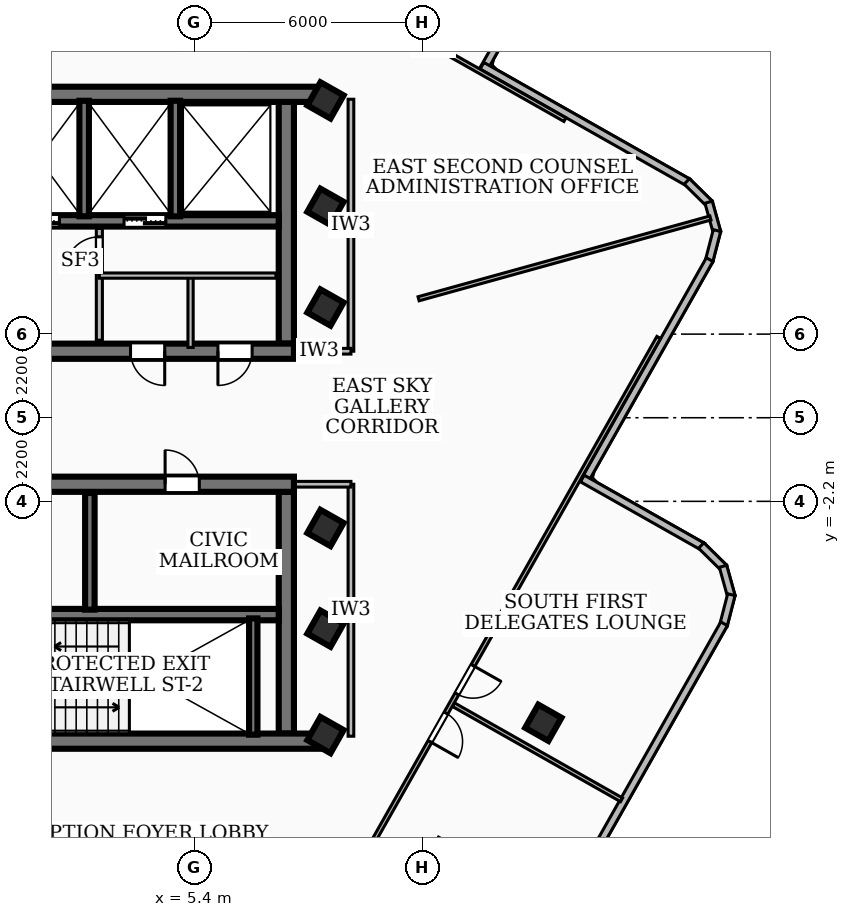
"""IFC4 building model, lengths in metres.
Left out: names, types, materials, properties, quantities, classifications, styles, units other than length and angle.
Written with IfcOpenShell. Run it as: python <this file> out.ifc"""

import sys

from ifc_helpers import new_model, si_unit, direction, frame, frame_2d, origin, origin_2d, place, context, subcontext, project, spatial, rectangle, extrude, element, fill, save


model = new_model("IFC4")
c1 = context("Model", 3, precision=1e-05, world=origin(), true_north=direction((0.0, 1.0)))
c2 = subcontext(c1, "Body", "Model", "MODEL_VIEW")
j1 = project(units=[si_unit("LENGTHUNIT", "METRE"), si_unit("PLANEANGLEUNIT", "RADIAN")], contexts=[c1])
p1 = place(None, origin())
s1 = spatial("IfcSite", under=j1, at=p1, CompositionType="ELEMENT")
p2 = place(p1, origin())
s2 = spatial("IfcBuilding", under=s1, at=p2, CompositionType="ELEMENT")
p3 = place(p2, frame((0.0, 0.0, 278.28)))
s3 = spatial("IfcBuildingStorey", under=s2, at=p3, CompositionType="ELEMENT", Elevation=278.28)
p4 = place(p3, frame((-8.78, 8.51, 0.0), z_axis=(0.0, 0.0, 1.0), x_axis=(1.0, 0.0, 0.0)))
e1 = element("IfcWall", 1, at=p4, inside=s3, PredefinedType="SHEAR", context=c2, shape_type="SweptSolid", body=[
    extrude(rectangle(XDim=17.56, YDim=0.4, at=frame_2d((8.78, 0.0))), origin(), (0.0, 0.0, 1.0), 3.16),
])
p5 = place(p3, frame((8.02, 1.75, 0.0), z_axis=(0.0, 0.0, 1.0), x_axis=(-1.0, 0.0, 0.0)))
e2 = element("IfcWall", 2, at=p5, inside=s3, PredefinedType="SHEAR", context=c2, shape_type="SweptSolid", body=[
    extrude(rectangle(XDim=16.04, YDim=0.4, at=frame_2d((8.02, 0.0))), origin(), (0.0, 0.0, 1.0), 3.16),
])
p6 = place(p5, frame((7.45, 0.0, 0.0)))
e3 = element("IfcOpeningElement", 3, at=p6, cuts=e2, PredefinedType="OPENING", context=c2, shape_type="SweptSolid", body=[
    extrude(rectangle(XDim=1.0, YDim=2.1, at=frame_2d((0.5, 1.05))), frame((0.0, 0.21, 0.0), z_axis=(0.0, -1.0, 0.0), x_axis=(1.0, 0.0, 0.0)), (0.0, 0.0, 1.0), 0.42),
])
p7 = place(p5, frame((14.285, 0.0, 0.0)))
e4 = element("IfcOpeningElement", 4, at=p7, cuts=e2, PredefinedType="OPENING", context=c2, shape_type="SweptSolid", body=[
    extrude(rectangle(XDim=1.05, YDim=2.15, at=frame_2d((0.525, 1.075))), frame((0.0, 0.21, 0.0), z_axis=(0.0, -1.0, 0.0), x_axis=(1.0, 0.0, 0.0)), (0.0, 0.0, 1.0), 0.42),
])
p8 = place(p5, frame((12.725, 0.0, 0.0)))
e5 = element("IfcOpeningElement", 5, at=p8, cuts=e2, PredefinedType="OPENING", context=c2, shape_type="SweptSolid", body=[
    extrude(rectangle(XDim=1.05, YDim=2.15, at=frame_2d((0.525, 1.075))), frame((0.0, 0.21, 0.0), z_axis=(0.0, -1.0, 0.0), x_axis=(1.0, 0.0, 0.0)), (0.0, 0.0, 1.0), 0.42),
])
p9 = place(p5, frame((11.165, 0.0, 0.0)))
e6 = element("IfcOpeningElement", 6, at=p9, cuts=e2, PredefinedType="OPENING", context=c2, shape_type="SweptSolid", body=[
    extrude(rectangle(XDim=1.05, YDim=2.15, at=frame_2d((0.525, 1.075))), frame((0.0, 0.21, 0.0), z_axis=(0.0, -1.0, 0.0), x_axis=(1.0, 0.0, 0.0)), (0.0, 0.0, 1.0), 0.42),
])
p10 = place(p5, frame((3.4, 0.0, 0.0)))
e7 = element("IfcOpeningElement", 7, at=p10, cuts=e2, PredefinedType="OPENING", context=c2, shape_type="SweptSolid", body=[
    extrude(rectangle(XDim=0.9, YDim=2.06, at=frame_2d((0.45, 1.03))), frame((0.0, 0.21, 0.0), z_axis=(0.0, -1.0, 0.0), x_axis=(1.0, 0.0, 0.0)), (0.0, 0.0, 1.0), 0.42),
])
p11 = place(p5, frame((1.1, 0.0, 0.0)))
e8 = element("IfcOpeningElement", 8, at=p11, cuts=e2, PredefinedType="OPENING", context=c2, shape_type="SweptSolid", body=[
    extrude(rectangle(XDim=0.9, YDim=2.06, at=frame_2d((0.45, 1.03))), frame((0.0, 0.21, 0.0), z_axis=(0.0, -1.0, 0.0), x_axis=(1.0, 0.0, 0.0)), (0.0, 0.0, 1.0), 0.42),
])
p12 = place(p3, frame((7.82, 8.31, 0.0), z_axis=(0.0, 0.0, 1.0), x_axis=(0.0, -1.0, 0.0)))
e9 = element("IfcWall", 9, at=p12, inside=s3, PredefinedType="SHEAR", context=c2, shape_type="SweptSolid", body=[
    extrude(rectangle(XDim=6.36, YDim=0.4, at=frame_2d((3.18, 0.0))), origin(), (0.0, 0.0, 1.0), 3.16),
])
p13 = place(p3, frame((7.62, 5.18, 0.0), z_axis=(0.0, 0.0, 1.0), x_axis=(-1.0, 0.0, 0.0)))
e10 = element("IfcWall", 10, at=p13, inside=s3, PredefinedType="SOLIDWALL", context=c2, shape_type="SweptSolid", body=[
    extrude(rectangle(XDim=15.24, YDim=0.3, at=frame_2d((7.62, 0.0))), origin(), (0.0, 0.0, 1.0), 3.16),
])
p14 = place(p13, frame((5.77, 0.0, 0.0)))
e11 = element("IfcOpeningElement", 11, at=p14, cuts=e10, PredefinedType="OPENING", context=c2, shape_type="SweptSolid", body=[
    extrude(rectangle(XDim=1.1, YDim=2.15, at=frame_2d((0.55, 1.075))), frame((0.0, 0.16, 0.0), z_axis=(0.0, -1.0, 0.0), x_axis=(1.0, 0.0, 0.0)), (0.0, 0.0, 1.0), 0.32),
])
p15 = place(p13, frame((2.97, 0.0, 0.0)))
e12 = element("IfcOpeningElement", 12, at=p15, cuts=e10, PredefinedType="OPENING", context=c2, shape_type="SweptSolid", body=[
    extrude(rectangle(XDim=1.1, YDim=2.15, at=frame_2d((0.55, 1.075))), frame((0.0, 0.16, 0.0), z_axis=(0.0, -1.0, 0.0), x_axis=(1.0, 0.0, 0.0)), (0.0, 0.0, 1.0), 0.32),
])
p16 = place(p13, frame((7.97, 0.0, 0.0)))
e13 = element("IfcOpeningElement", 13, at=p16, cuts=e10, PredefinedType="OPENING", context=c2, shape_type="SweptSolid", body=[
    extrude(rectangle(XDim=1.0, YDim=2.1, at=frame_2d((0.5, 1.05))), frame((0.0, 0.16, 0.0), z_axis=(0.0, -1.0, 0.0), x_axis=(1.0, 0.0, 0.0)), (0.0, 0.0, 1.0), 0.32),
])
p17 = place(p3, frame((8.78, -8.51, 0.0), z_axis=(0.0, 0.0, 1.0), x_axis=(-1.0, 0.0, 0.0)))
e14 = element("IfcWall", 14, at=p17, inside=s3, PredefinedType="SHEAR", context=c2, shape_type="SweptSolid", body=[
    extrude(rectangle(XDim=17.56, YDim=0.4, at=frame_2d((8.78, 0.0))), origin(), (0.0, 0.0, 1.0), 3.16),
])
p18 = place(p3, frame((-8.02, -1.75, 0.0), z_axis=(0.0, 0.0, 1.0), x_axis=(1.0, 0.0, 0.0)))
e15 = element("IfcWall", 15, at=p18, inside=s3, PredefinedType="SHEAR", context=c2, shape_type="SweptSolid", body=[
    extrude(rectangle(XDim=16.04, YDim=0.4, at=frame_2d((8.02, 0.0))), origin(), (0.0, 0.0, 1.0), 3.16),
])
p19 = place(p18, frame((7.45, 0.0, 0.0)))
e16 = element("IfcOpeningElement", 16, at=p19, cuts=e15, PredefinedType="OPENING", context=c2, shape_type="SweptSolid", body=[
    extrude(rectangle(XDim=1.0, YDim=2.1, at=frame_2d((0.5, 1.05))), frame((0.0, 0.21, 0.0), z_axis=(0.0, -1.0, 0.0), x_axis=(1.0, 0.0, 0.0)), (0.0, 0.0, 1.0), 0.42),
])
p20 = place(p18, frame((12.65, 0.0, 0.0)))
e17 = element("IfcOpeningElement", 17, at=p20, cuts=e15, PredefinedType="OPENING", context=c2, shape_type="SweptSolid", body=[
    extrude(rectangle(XDim=0.9, YDim=2.06, at=frame_2d((0.45, 1.03))), frame((0.0, 0.21, 0.0), z_axis=(0.0, -1.0, 0.0), x_axis=(1.0, 0.0, 0.0)), (0.0, 0.0, 1.0), 0.42),
])
p21 = place(p18, frame((2.25, 0.0, 0.0)))
e18 = element("IfcOpeningElement", 18, at=p21, cuts=e15, PredefinedType="OPENING", context=c2, shape_type="SweptSolid", body=[
    extrude(rectangle(XDim=0.9, YDim=2.06, at=frame_2d((0.45, 1.03))), frame((0.0, 0.21, 0.0), z_axis=(0.0, -1.0, 0.0), x_axis=(1.0, 0.0, 0.0)), (0.0, 0.0, 1.0), 0.42),
])
p22 = place(p3, frame((7.82, -1.95, 0.0), z_axis=(0.0, 0.0, 1.0), x_axis=(0.0, -1.0, 0.0)))
e19 = element("IfcWall", 19, at=p22, inside=s3, PredefinedType="SHEAR", context=c2, shape_type="SweptSolid", body=[
    extrude(rectangle(XDim=6.36, YDim=0.4, at=frame_2d((3.18, 0.0))), origin(), (0.0, 0.0, 1.0), 3.16),
])
p23 = place(p3, frame((-7.62, -5.18, 0.0), z_axis=(0.0, 0.0, 1.0), x_axis=(1.0, 0.0, 0.0)))
e20 = element("IfcWall", 20, at=p23, inside=s3, PredefinedType="SOLIDWALL", context=c2, shape_type="SweptSolid", body=[
    extrude(rectangle(XDim=15.24, YDim=0.3, at=frame_2d((7.62, 0.0))), origin(), (0.0, 0.0, 1.0), 3.16),
])
p24 = place(p23, frame((5.77, 0.0, 0.0)))
e21 = element("IfcOpeningElement", 21, at=p24, cuts=e20, PredefinedType="OPENING", context=c2, shape_type="SweptSolid", body=[
    extrude(rectangle(XDim=1.1, YDim=2.15, at=frame_2d((0.55, 1.075))), frame((0.0, 0.16, 0.0), z_axis=(0.0, -1.0, 0.0), x_axis=(1.0, 0.0, 0.0)), (0.0, 0.0, 1.0), 0.32),
])
p25 = place(p23, frame((7.97, 0.0, 0.0)))
e22 = element("IfcOpeningElement", 22, at=p25, cuts=e20, PredefinedType="OPENING", context=c2, shape_type="SweptSolid", body=[
    extrude(rectangle(XDim=1.0, YDim=2.1, at=frame_2d((0.5, 1.05))), frame((0.0, 0.16, 0.0), z_axis=(0.0, -1.0, 0.0), x_axis=(1.0, 0.0, 0.0)), (0.0, 0.0, 1.0), 0.32),
])
p26 = place(p3, frame((6.95, -8.34, 0.0), z_axis=(0.0, 0.0, 1.0), x_axis=(0.0, 1.0, 0.0)))
e23 = element("IfcWall", 23, at=p26, inside=s3, PredefinedType="SOLIDWALL", context=c2, shape_type="SweptSolid", body=[
    extrude(rectangle(XDim=3.06, YDim=0.22, at=frame_2d((1.53, 0.0))), origin(), (0.0, 0.0, 1.0), 3.16),
])
for number, where, z_axis, x_axis in (
    (24, (2.5, 5.3, 0.0), (0.0, 0.0, 1.0), (0.0, 1.0, 0.0)),
    (25, (4.9, 5.3, 0.0), (0.0, 0.0, 1.0), (0.0, 1.0, 0.0)),
):
    element("IfcWall", number, at=place(p3, frame(where, z_axis=z_axis, x_axis=x_axis)), inside=s3, PredefinedType="SOLIDWALL", context=c2, shape_type="SweptSolid", body=[
        extrude(rectangle(XDim=3.04, YDim=0.25, at=frame_2d((1.52, 0.0))), origin(), (0.0, 0.0, 1.0), 3.16),
    ])
p27 = place(p3, frame((2.65, -5.05, 0.0), z_axis=(0.0, 0.0, 1.0), x_axis=(0.0, 1.0, 0.0)))
e26 = element("IfcWall", 26, at=p27, inside=s3, PredefinedType="SOLIDWALL", context=c2, shape_type="SweptSolid", body=[
    extrude(rectangle(XDim=3.07, YDim=0.25, at=frame_2d((1.535, 0.0))), origin(), (0.0, 0.0, 1.0), 3.16),
])
for number, where, z_axis, x_axis in (
    (27, (8.85, -5.55, 0.0), (0.0, 0.0, 1.0), (0.493, 0.87, 0.0)),
    (28, (8.85, -2.9, 0.0), (0.0, 0.0, 1.0), (0.493, 0.87, 0.0)),
    (29, (8.85, 2.9, 0.0), (0.0, 0.0, 1.0), (0.493, 0.87, 0.0)),
    (30, (8.85, 5.55, 0.0), (0.0, 0.0, 1.0), (0.493, 0.87, 0.0)),
    (31, (8.85, -8.35, 0.0), (0.0, 0.0, 1.0), (0.493, 0.87, 0.0)),
    (32, (8.85, 8.35, 0.0), (0.0, 0.0, 1.0), (0.493, 0.87, 0.0)),
    (33, (14.583, -8.026, 0.0), (0.0, 0.0, 1.0), (0.493, 0.87, 0.0)),
):
    element("IfcColumn", number, at=place(p3, frame(where, z_axis=z_axis, x_axis=x_axis)), inside=s3, PredefinedType="COLUMN", context=c2, shape_type="SweptSolid", body=[
        extrude(rectangle(XDim=0.7, YDim=0.7, at=origin_2d()), origin(), (0.0, 0.0, 1.0), 3.42),
    ])
p28 = place(p3, frame((17.058, 16.326, 0.0), z_axis=(0.0, 0.0, 1.0), x_axis=(-0.492504245901, -0.870310041175, 0.0)))
e34 = element("IfcWall", 34, at=p28, inside=s3, PredefinedType="SOLIDWALL", context=c2, shape_type="SweptSolid", body=[
    extrude(rectangle(XDim=8.242, YDim=0.2, at=frame_2d((4.121, 0.0))), origin(), (0.0, 0.0, 1.0), 3.16),
])
p29 = place(p28, frame((0.85, 0.0, 0.85)))
e35 = element("IfcOpeningElement", 35, at=p29, cuts=e34, PredefinedType="OPENING", context=c2, shape_type="SweptSolid", body=[
    extrude(rectangle(XDim=2.4, YDim=2.1, at=frame_2d((1.2, 1.05))), frame((0.0, 0.11, 0.0), z_axis=(0.0, -1.0, 0.0), x_axis=(1.0, 0.0, 0.0)), (0.0, 0.0, 1.0), 0.22),
])
p30 = place(p3, frame((12.968, 9.262, 0.0), z_axis=(0.0, 0.0, 1.0), x_axis=(0.87026539867, -0.492583125855, 0.0)))
e36 = element("IfcWall", 36, at=p30, inside=s3, PredefinedType="SOLIDWALL", context=c2, shape_type="SweptSolid", body=[
    extrude(rectangle(XDim=6.24, YDim=0.2, at=frame_2d((3.12, 0.0))), origin(), (0.0, 0.0, 1.0), 3.16),
])
p31 = place(p3, frame((18.359, 6.218, 0.0), z_axis=(0.0, 0.0, 1.0), x_axis=(0.712466161804, -0.701706468749, 0.0)))
e37 = element("IfcWall", 37, at=p31, inside=s3, PredefinedType="SOLIDWALL", context=c2, shape_type="SweptSolid", body=[
    extrude(rectangle(XDim=0.84, YDim=0.2, at=frame_2d((0.42, 0.0))), origin(), (0.0, 0.0, 1.0), 3.16),
])
p32 = place(p3, frame((18.932, 5.671, 0.0), z_axis=(0.0, 0.0, 1.0), x_axis=(0.268377126675, -0.963313924885, 0.0)))
e38 = element("IfcWall", 38, at=p32, inside=s3, PredefinedType="SOLIDWALL", context=c2, shape_type="SweptSolid", body=[
    extrude(rectangle(XDim=0.824, YDim=0.2, at=frame_2d((0.412, 0.0))), origin(), (0.0, 0.0, 1.0), 3.16),
])
p33 = place(p3, frame((19.152, 4.925, 0.0), z_axis=(0.0, 0.0, 1.0), x_axis=(-0.250891369276, -0.968015248239, 0.0)))
e39 = element("IfcWall", 39, at=p33, inside=s3, PredefinedType="SOLIDWALL", context=c2, shape_type="SweptSolid", body=[
    extrude(rectangle(XDim=0.838, YDim=0.2, at=frame_2d((0.419, 0.0))), origin(), (0.0, 0.0, 1.0), 3.16),
])
p34 = place(p3, frame((18.96, 4.16, 0.0), z_axis=(0.0, 0.0, 1.0), x_axis=(-0.492441425139, -0.870345588147, 0.0)))
e40 = element("IfcWall", 40, at=p34, inside=s3, PredefinedType="SOLIDWALL", context=c2, shape_type="SweptSolid", body=[
    extrude(rectangle(XDim=6.742, YDim=0.2, at=frame_2d((3.371, 0.0))), origin(), (0.0, 0.0, 1.0), 3.16),
])
p35 = place(p3, frame((15.609, -1.599, 0.0), z_axis=(0.0, 0.0, 1.0), x_axis=(0.87036421417, -0.49240850388, 0.0)))
e41 = element("IfcWall", 41, at=p35, inside=s3, PredefinedType="SOLIDWALL", context=c2, shape_type="SweptSolid", body=[
    extrude(rectangle(XDim=3.641, YDim=0.2, at=frame_2d((1.821, 0.0))), origin(), (0.0, 0.0, 1.0), 3.16),
])
p36 = place(p3, frame((18.738, -3.362, 0.0), z_axis=(0.0, 0.0, 1.0), x_axis=(0.712468358306, -0.70170423856, 0.0)))
e42 = element("IfcWall", 42, at=p36, inside=s3, PredefinedType="SOLIDWALL", context=c2, shape_type="SweptSolid", body=[
    extrude(rectangle(XDim=0.839, YDim=0.2, at=frame_2d((0.419, 0.0))), origin(), (0.0, 0.0, 1.0), 3.16),
])
p37 = place(p3, frame((19.311, -3.909, 0.0), z_axis=(0.0, 0.0, 1.0), x_axis=(0.267720149776, -0.963496715824, 0.0)))
e43 = element("IfcWall", 43, at=p37, inside=s3, PredefinedType="SOLIDWALL", context=c2, shape_type="SweptSolid", body=[
    extrude(rectangle(XDim=0.825, YDim=0.2, at=frame_2d((0.413, 0.0))), origin(), (0.0, 0.0, 1.0), 3.16),
])
p38 = place(p3, frame((19.531, -4.656, 0.0), z_axis=(0.0, 0.0, 1.0), x_axis=(-0.250618286331, -0.968085985105, 0.0)))
e44 = element("IfcWall", 44, at=p38, inside=s3, PredefinedType="SOLIDWALL", context=c2, shape_type="SweptSolid", body=[
    extrude(rectangle(XDim=0.838, YDim=0.2, at=frame_2d((0.419, 0.0))), origin(), (0.0, 0.0, 1.0), 3.16),
])
p39 = place(p3, frame((19.339, -5.421, 0.0), z_axis=(0.0, 0.0, 1.0), x_axis=(-0.492615794655, -0.870246906835, 0.0)))
e45 = element("IfcWall", 45, at=p39, inside=s3, PredefinedType="SOLIDWALL", context=c2, shape_type="SweptSolid", body=[
    extrude(rectangle(XDim=10.124, YDim=0.2, at=frame_2d((5.062, 0.0))), origin(), (0.0, 0.0, 1.0), 3.16),
])
p40 = place(p39, frame((6.696, 0.0, 0.85)))
e46 = element("IfcOpeningElement", 46, at=p40, cuts=e45, PredefinedType="OPENING", context=c2, shape_type="SweptSolid", body=[
    extrude(rectangle(XDim=2.4, YDim=2.1, at=frame_2d((1.2, 1.05))), frame((0.0, 0.11, 0.0), z_axis=(0.0, -1.0, 0.0), x_axis=(1.0, 0.0, 0.0)), (0.0, 0.0, 1.0), 0.22),
])
p41 = place(p3, frame((2.9, 2.04, 0.0), z_axis=(0.0, 0.0, 1.0), x_axis=(0.0, 1.0, 0.0)))
e47 = element("IfcWall", 47, at=p41, inside=s3, PredefinedType="PARTITIONING", context=c2, shape_type="SweptSolid", body=[
    extrude(rectangle(XDim=2.94, YDim=0.16, at=frame_2d((1.47, 0.0))), origin(), (0.0, 0.0, 1.0), 2.39),
])
p42 = place(p41, frame((1.82, 0.0, 0.0)))
e48 = element("IfcOpeningElement", 48, at=p42, cuts=e47, PredefinedType="OPENING", context=c2, shape_type="SweptSolid", body=[
    extrude(rectangle(XDim=0.9, YDim=2.06, at=frame_2d((0.45, 1.03))), frame((0.0, 0.09, 0.0), z_axis=(0.0, -1.0, 0.0), x_axis=(1.0, 0.0, 0.0)), (0.0, 0.0, 1.0), 0.18),
])
p43 = place(p3, frame((2.9, 3.74, 0.0), z_axis=(0.0, 0.0, 1.0), x_axis=(1.0, 0.0, 0.0)))
e49 = element("IfcWall", 49, at=p43, inside=s3, PredefinedType="PARTITIONING", context=c2, shape_type="SweptSolid", body=[
    extrude(rectangle(XDim=4.65, YDim=0.138, at=frame_2d((2.325, 0.0))), origin(), (0.0, 0.0, 1.0), 3.16),
])
p44 = place(p3, frame((5.3, 1.85, 0.0), z_axis=(0.0, 0.0, 1.0), x_axis=(0.0, 1.0, 0.0)))
e50 = element("IfcWall", 50, at=p44, inside=s3, PredefinedType="PARTITIONING", context=c2, shape_type="SweptSolid", body=[
    extrude(rectangle(XDim=1.89, YDim=0.138, at=frame_2d((0.945, 0.0))), origin(), (0.0, 0.0, 1.0), 2.39),
])
p45 = place(p3, frame((9.52, 1.75, 0.0), z_axis=(0.0, 0.0, 1.0), x_axis=(0.0, 1.0, 0.0)))
e51 = element("IfcWall", 51, at=p45, inside=s3, PredefinedType="PARTITIONING", context=c2, shape_type="SweptSolid", body=[
    extrude(rectangle(XDim=6.63, YDim=0.15, at=frame_2d((3.315, 0.0))), origin(), (0.0, 0.0, 1.0), 3.16),
])
p46 = place(p3, frame((7.85, 1.75, 0.0), z_axis=(0.0, 0.0, 1.0), x_axis=(1.0, 0.0, 0.0)))
e52 = element("IfcWall", 52, at=p46, inside=s3, PredefinedType="PARTITIONING", context=c2, shape_type="SweptSolid", body=[
    extrude(rectangle(XDim=1.67, YDim=0.15, at=frame_2d((0.835, 0.0))), origin(), (0.0, 0.0, 1.0), 2.39),
])
p47 = place(p3, frame((9.52, -8.38, 0.0), z_axis=(0.0, 0.0, 1.0), x_axis=(0.0, 1.0, 0.0)))
e53 = element("IfcWall", 53, at=p47, inside=s3, PredefinedType="PARTITIONING", context=c2, shape_type="SweptSolid", body=[
    extrude(rectangle(XDim=6.63, YDim=0.15, at=frame_2d((3.315, 0.0))), origin(), (0.0, 0.0, 1.0), 2.53),
])
p48 = place(p3, frame((7.85, -1.75, 0.0), z_axis=(0.0, 0.0, 1.0), x_axis=(1.0, 0.0, 0.0)))
e54 = element("IfcWall", 54, at=p48, inside=s3, PredefinedType="PARTITIONING", context=c2, shape_type="SweptSolid", body=[
    extrude(rectangle(XDim=1.67, YDim=0.15, at=frame_2d((0.835, 0.0))), origin(), (0.0, 0.0, 1.0), 2.39),
])
p49 = place(p3, frame((11.3, 3.13, 0.0), z_axis=(0.0, 0.0, 1.0), x_axis=(0.963747113025, 0.26681735726, 0.0)))
e55 = element("IfcWall", 55, at=p49, inside=s3, PredefinedType="PARTITIONING", context=c2, shape_type="SweptSolid", body=[
    extrude(rectangle(XDim=7.969, YDim=0.11, at=frame_2d((3.984, 0.0))), origin(), (0.0, 0.0, 1.0), 3.16),
])
p50 = place(p3, frame((15.152, 7.843, 0.0), z_axis=(0.0, 0.0, 1.0), x_axis=(-0.87023152106, 0.492642973921, 0.0)))
e56 = element("IfcWall", 56, at=p50, inside=s3, PredefinedType="PARTITIONING", context=c2, shape_type="SweptSolid", body=[
    extrude(rectangle(XDim=7.951, YDim=0.11, at=frame_2d((3.976, 0.0))), origin(), (0.0, 0.0, 1.0), 2.53),
])
p51 = place(p3, frame((12.216, -7.549, 0.0), z_axis=(0.0, 0.0, 1.0), x_axis=(0.870245204201, -0.492618802488, 0.0)))
e57 = element("IfcWall", 57, at=p51, inside=s3, PredefinedType="PARTITIONING", context=c2, shape_type="SweptSolid", body=[
    extrude(rectangle(XDim=5.085, YDim=0.11, at=frame_2d((2.542, 0.0))), origin(), (0.0, 0.0, 1.0), 2.53),
])
p52 = place(p3, frame((17.619, 2.113, 0.0), z_axis=(0.0, 0.0, 1.0), x_axis=(-0.492746831558, -0.870172718482, 0.0)))
e58 = element("IfcWall", 58, at=p52, inside=s3, PredefinedType="PARTITIONING", context=c2, shape_type="SweptSolid", body=[
    extrude(rectangle(XDim=20.54, YDim=0.11, at=frame_2d((10.27, 0.0))), origin(), (0.0, 0.0, 1.0), 2.53),
])
p53 = place(p52, frame((11.36, 0.0, 0.0)))
e59 = element("IfcOpeningElement", 59, at=p53, cuts=e58, PredefinedType="OPENING", context=c2, shape_type="SweptSolid", body=[
    extrude(rectangle(XDim=0.86, YDim=2.04, at=frame_2d((0.43, 1.02))), frame((0.0, 0.065, 0.0), z_axis=(0.0, -1.0, 0.0), x_axis=(1.0, 0.0, 0.0)), (0.0, 0.0, 1.0), 0.13),
])
p54 = place(p52, frame((9.92, 0.0, 0.0)))
e60 = element("IfcOpeningElement", 60, at=p54, cuts=e58, PredefinedType="OPENING", context=c2, shape_type="SweptSolid", body=[
    extrude(rectangle(XDim=0.86, YDim=2.04, at=frame_2d((0.43, 1.02))), frame((0.0, 0.065, 0.0), z_axis=(0.0, -1.0, 0.0), x_axis=(1.0, 0.0, 0.0)), (0.0, 0.0, 1.0), 0.13),
])
p55 = place(p14, origin())
e61 = element("IfcDoor", 61, at=p55, inside=s3, OperationType="DOUBLE_DOOR_SLIDING", PredefinedType="DOOR", context=c2, shape_type="SweptSolid", body=[
    extrude(rectangle(XDim=1.1, YDim=2.15, at=frame_2d((0.55, 1.075))), frame((0.0, 0.025, 0.0), z_axis=(0.0, -1.0, 0.0), x_axis=(1.0, 0.0, 0.0)), (0.0, 0.0, 1.0), 0.05),
])
fill(e11, e61)
p56 = place(p15, origin())
e62 = element("IfcDoor", 62, at=p56, inside=s3, OperationType="DOUBLE_DOOR_SLIDING", PredefinedType="DOOR", context=c2, shape_type="SweptSolid", body=[
    extrude(rectangle(XDim=1.1, YDim=2.15, at=frame_2d((0.55, 1.075))), frame((0.0, 0.025, 0.0), z_axis=(0.0, -1.0, 0.0), x_axis=(1.0, 0.0, 0.0)), (0.0, 0.0, 1.0), 0.05),
])
fill(e12, e62)
p57 = place(p20, origin())
e63 = element("IfcDoor", 63, at=p57, inside=s3, OperationType="SINGLE_SWING_LEFT", PredefinedType="DOOR", context=c2, shape_type="SweptSolid", body=[
    extrude(rectangle(XDim=0.9, YDim=2.06, at=frame_2d((0.45, 1.03))), frame((0.0, 0.025, 0.0), z_axis=(0.0, -1.0, 0.0), x_axis=(1.0, 0.0, 0.0)), (0.0, 0.0, 1.0), 0.05),
])
fill(e17, e63)
p58 = place(p10, origin())
e64 = element("IfcDoor", 64, at=p58, inside=s3, OperationType="SINGLE_SWING_LEFT", PredefinedType="DOOR", context=c2, shape_type="SweptSolid", body=[
    extrude(rectangle(XDim=0.9, YDim=2.06, at=frame_2d((0.45, 1.03))), frame((0.0, 0.025, 0.0), z_axis=(0.0, -1.0, 0.0), x_axis=(1.0, 0.0, 0.0)), (0.0, 0.0, 1.0), 0.05),
])
fill(e7, e64)
p59 = place(p11, origin())
e65 = element("IfcDoor", 65, at=p59, inside=s3, OperationType="SINGLE_SWING_RIGHT", PredefinedType="DOOR", context=c2, shape_type="SweptSolid", body=[
    extrude(rectangle(XDim=0.9, YDim=2.06, at=frame_2d((0.45, 1.03))), frame((0.0, 0.025, 0.0), z_axis=(0.0, -1.0, 0.0), x_axis=(1.0, 0.0, 0.0)), (0.0, 0.0, 1.0), 0.05),
])
fill(e8, e65)
p60 = place(p42, origin())
e66 = element("IfcDoor", 66, at=p60, inside=s3, OperationType="SINGLE_SWING_LEFT", PredefinedType="DOOR", context=c2, shape_type="SweptSolid", body=[
    extrude(rectangle(XDim=0.9, YDim=2.06, at=frame_2d((0.45, 1.03))), frame((0.0, 0.025, 0.0), z_axis=(0.0, -1.0, 0.0), x_axis=(1.0, 0.0, 0.0)), (0.0, 0.0, 1.0), 0.05),
])
fill(e48, e66)
p61 = place(p53, origin())
e67 = element("IfcDoor", 67, at=p61, inside=s3, OperationType="SINGLE_SWING_RIGHT", PredefinedType="DOOR", context=c2, shape_type="SweptSolid", body=[
    extrude(rectangle(XDim=0.86, YDim=2.04, at=frame_2d((0.43, 1.02))), frame((0.0, 0.025, 0.0), z_axis=(0.0, -1.0, 0.0), x_axis=(1.0, 0.0, 0.0)), (0.0, 0.0, 1.0), 0.05),
])
fill(e59, e67)
p62 = place(p54, origin())
e68 = element("IfcDoor", 68, at=p62, inside=s3, OperationType="SINGLE_SWING_LEFT", PredefinedType="DOOR", context=c2, shape_type="SweptSolid", body=[
    extrude(rectangle(XDim=0.86, YDim=2.04, at=frame_2d((0.43, 1.02))), frame((0.0, 0.025, 0.0), z_axis=(0.0, -1.0, 0.0), x_axis=(1.0, 0.0, 0.0)), (0.0, 0.0, 1.0), 0.05),
])
fill(e60, e68)
save(model, sys.argv[1])
